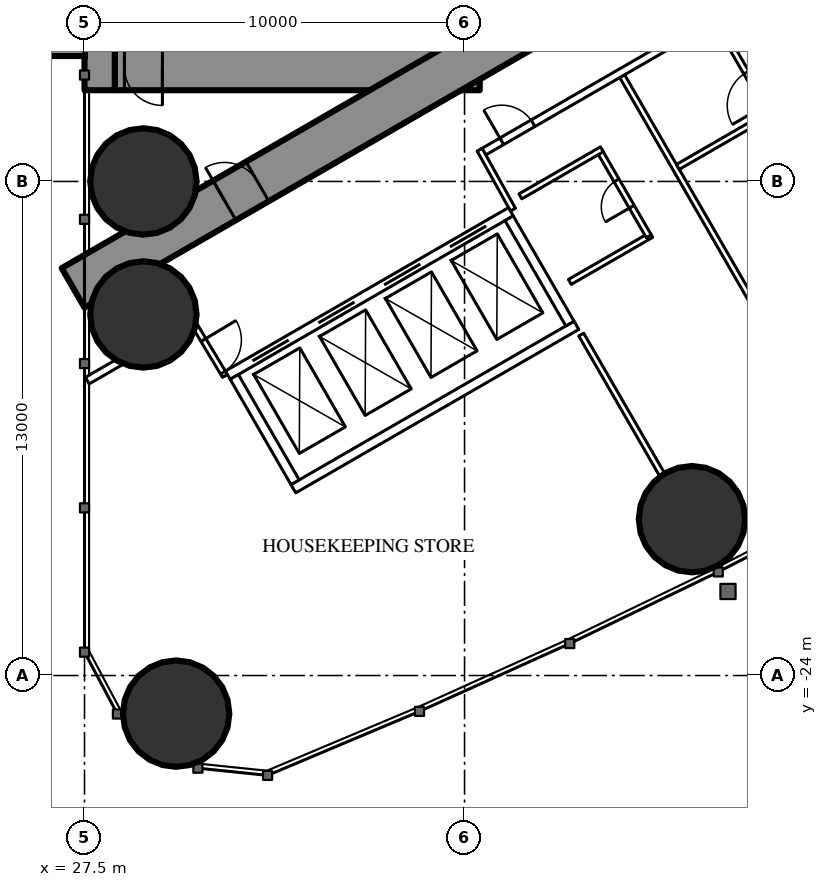
"""IFC4 building model, lengths in metres.
Left out: names, types, materials, properties, quantities, classifications, styles, units other than length and angle.
Written with IfcOpenShell. Run it as: python <this file> out.ifc"""

import sys

from ifc_helpers import new_model, si_unit, direction, frame, frame_2d, origin, origin_2d, place, context, subcontext, project, spatial, rectangle, hollow_circle, extrude, element, fill, save


model = new_model("IFC4")
c1 = context("Model", 3, precision=1e-05, world=origin(), true_north=direction((0.0, 1.0)))
c2 = subcontext(c1, "Body", "Model", "MODEL_VIEW")
j1 = project(units=[si_unit("LENGTHUNIT", "METRE"), si_unit("PLANEANGLEUNIT", "RADIAN")], contexts=[c1])
p1 = place(None, origin())
s1 = spatial("IfcSite", under=j1, at=p1, CompositionType="ELEMENT")
p2 = place(p1, origin())
s2 = spatial("IfcBuilding", under=s1, at=p2, CompositionType="ELEMENT")
p3 = place(p2, frame((0.0, 0.0, 42.5)))
s3 = spatial("IfcBuildingStorey", under=s2, at=p3, CompositionType="ELEMENT", Elevation=42.5)
for number, where, z_axis, x_axis in (
    (1, (29.911, -25.002, 0.0), (0.0, 0.0, 1.0), (1.0, 0.0, 0.0)),
    (2, (29.05, -11.0, 0.0), (0.0, 0.0, 1.0), (1.0, 0.0, 0.0)),
    (3, (29.05, -14.5, 0.0), (0.0, 0.0, 1.0), (1.0, 0.0, 0.0)),
    (4, (43.484, -19.886, 0.0), (0.0, 0.0, 1.0), (1.0, 0.0, 0.0)),
):
    element("IfcColumn", number, at=place(p3, frame(where, z_axis=z_axis, x_axis=x_axis)), inside=s3, PredefinedType="COLUMN", context=c2, shape_type="SweptSolid", body=[
        extrude(hollow_circle(Radius=1.4, WallThickness=0.12, at=origin_2d()), origin(), (0.0, 0.0, 1.0), 3.5),
    ])
p4 = place(p3, frame((27.9, -8.6, 0.0), z_axis=(0.0, 0.0, 1.0), x_axis=(0.0, 1.0, 0.0)))
e5 = element("IfcWall", 5, at=p4, inside=s3, PredefinedType="SHEAR", context=c2, shape_type="SweptSolid", body=[
    extrude(rectangle(XDim=17.2, YDim=0.8, at=frame_2d((8.6, 0.0))), origin(), (0.0, 0.0, 1.0), 3.5),
])
p5 = place(p4, frame((2.45, 0.0, 0.6)))
e6 = element("IfcOpeningElement", 6, at=p5, cuts=e5, PredefinedType="OPENING", context=c2, shape_type="SweptSolid", body=[
    extrude(rectangle(XDim=0.6, YDim=2.1, at=frame_2d((0.3, 1.05))), frame((0.0, 0.41, 0.0), z_axis=(0.0, -1.0, 0.0), x_axis=(1.0, 0.0, 0.0)), (0.0, 0.0, 1.0), 0.82),
])
p6 = place(p4, frame((14.15, 0.0, 0.6)))
e7 = element("IfcOpeningElement", 7, at=p6, cuts=e5, PredefinedType="OPENING", context=c2, shape_type="SweptSolid", body=[
    extrude(rectangle(XDim=0.6, YDim=2.1, at=frame_2d((0.3, 1.05))), frame((0.0, 0.41, 0.0), z_axis=(0.0, -1.0, 0.0), x_axis=(1.0, 0.0, 0.0)), (0.0, 0.0, 1.0), 0.82),
])
p7 = place(p3, frame((37.3, -8.6, 0.0), z_axis=(0.0, 0.0, 1.0), x_axis=(0.0, 1.0, 0.0)))
e8 = element("IfcWall", 8, at=p7, inside=s3, PredefinedType="SHEAR", context=c2, shape_type="SweptSolid", body=[
    extrude(rectangle(XDim=17.2, YDim=1.2, at=frame_2d((8.6, 0.0))), origin(), (0.0, 0.0, 1.0), 3.5),
])
p8 = place(p7, frame((7.7, 0.0, 0.0)))
e9 = element("IfcOpeningElement", 9, at=p8, cuts=e8, PredefinedType="OPENING", context=c2, shape_type="SweptSolid", body=[
    extrude(rectangle(XDim=1.8, YDim=2.2, at=frame_2d((0.9, 1.1))), frame((0.0, 0.61, 0.0), z_axis=(0.0, -1.0, 0.0), x_axis=(1.0, 0.0, 0.0)), (0.0, 0.0, 1.0), 1.22),
])
p9 = place(p3, frame((28.3, -8.0, 0.0), z_axis=(0.0, 0.0, 1.0), x_axis=(1.0, 0.0, 0.0)))
e10 = element("IfcWall", 10, at=p9, inside=s3, PredefinedType="SHEAR", context=c2, shape_type="SweptSolid", body=[
    extrude(rectangle(XDim=8.4, YDim=1.2, at=frame_2d((4.2, 0.0))), origin(), (0.0, 0.0, 1.0), 3.5),
])
p10 = place(p9, frame((0.25, 0.0, 0.0)))
e11 = element("IfcOpeningElement", 11, at=p10, cuts=e10, PredefinedType="OPENING", context=c2, shape_type="SweptSolid", body=[
    extrude(rectangle(XDim=1.0, YDim=2.2, at=frame_2d((0.5, 1.1))), frame((0.0, 0.61, 0.0), z_axis=(0.0, -1.0, 0.0), x_axis=(1.0, 0.0, 0.0)), (0.0, 0.0, 1.0), 1.22),
])
p11 = place(p3, frame((27.2, -13.8, 0.0), z_axis=(0.0, 0.0, 1.0), x_axis=(0.866027159892, 0.499996958321, 0.0)))
e12 = element("IfcWall", 12, at=p11, inside=s3, PredefinedType="SHEAR", context=c2, shape_type="SweptSolid", body=[
    extrude(rectangle(XDim=27.947, YDim=1.2, at=frame_2d((13.973, 0.0))), origin(), (0.0, 0.0, 1.0), 3.5),
])
p12 = place(p11, frame((4.6, 0.0, 0.0)))
e13 = element("IfcOpeningElement", 13, at=p12, cuts=e12, PredefinedType="OPENING", context=c2, shape_type="SweptSolid", body=[
    extrude(rectangle(XDim=1.0, YDim=2.2, at=frame_2d((0.5, 1.1))), frame((0.0, 0.61, 0.0), z_axis=(0.0, -1.0, 0.0), x_axis=(1.0, 0.0, 0.0)), (0.0, 0.0, 1.0), 1.22),
])
p13 = place(p11, frame((13.395, 0.0, 0.0)))
e14 = element("IfcOpeningElement", 14, at=p13, cuts=e12, PredefinedType="OPENING", context=c2, shape_type="SweptSolid", body=[
    extrude(rectangle(XDim=1.8, YDim=2.2, at=frame_2d((0.9, 1.1))), frame((0.0, 0.61, 0.0), z_axis=(0.0, -1.0, 0.0), x_axis=(1.0, 0.0, 0.0)), (0.0, 0.0, 1.0), 1.22),
])
p14 = place(p3, frame((41.647, -8.23, 0.0), z_axis=(0.0, 0.0, 1.0), x_axis=(0.49998590462, -0.866033541603, 0.0)))
e15 = element("IfcWall", 15, at=p14, inside=s3, PredefinedType="PARTITIONING", context=c2, shape_type="SweptSolid", body=[
    extrude(rectangle(XDim=12.621, YDim=0.15, at=frame_2d((6.311, 0.0))), origin(), (0.0, 0.0, 1.0), 3.25),
])
p15 = place(p3, frame((40.57, -15.03, 0.0), z_axis=(0.0, 0.0, 1.0), x_axis=(0.500012993597, -0.866017901798, 0.0)))
e16 = element("IfcWall", 16, at=p15, inside=s3, PredefinedType="PARTITIONING", context=c2, shape_type="SweptSolid", body=[
    extrude(rectangle(XDim=4.243, YDim=0.15, at=frame_2d((2.122, 0.0))), origin(), (0.0, 0.0, 1.0), 3.25),
])
p16 = place(p3, frame((27.572, -16.241, 0.0), z_axis=(0.0, 0.0, 1.0), x_axis=(0.866029654818, 0.499992636921, 0.0)))
e17 = element("IfcWall", 17, at=p16, inside=s3, PredefinedType="PARTITIONING", context=c2, shape_type="SweptSolid", body=[
    extrude(rectangle(XDim=3.155, YDim=0.2, at=frame_2d((1.577, 0.0))), origin(), (0.0, 0.0, 1.0), 3.25),
])
p17 = place(p3, frame((37.96, -10.243, 0.0), z_axis=(0.0, 0.0, 1.0), x_axis=(0.866026429433, 0.499998223521, 0.0)))
e18 = element("IfcWall", 18, at=p17, inside=s3, PredefinedType="PARTITIONING", context=c2, shape_type="SweptSolid", body=[
    extrude(rectangle(XDim=20.487, YDim=0.2, at=frame_2d((10.243, 0.0))), origin(), (0.0, 0.0, 1.0), 3.25),
])
p18 = place(p17, frame((7.325, 0.0, 0.0)))
e19 = element("IfcOpeningElement", 19, at=p18, cuts=e18, PredefinedType="OPENING", context=c2, shape_type="SweptSolid", body=[
    extrude(rectangle(XDim=1.0, YDim=2.2, at=frame_2d((0.5, 1.1))), frame((0.0, 0.11, 0.0), z_axis=(0.0, -1.0, 0.0), x_axis=(1.0, 0.0, 0.0)), (0.0, 0.0, 1.0), 0.22),
])
p19 = place(p17, frame((18.937, 0.0, 0.0)))
e20 = element("IfcOpeningElement", 20, at=p19, cuts=e18, PredefinedType="OPENING", context=c2, shape_type="SweptSolid", body=[
    extrude(rectangle(XDim=0.95, YDim=2.2, at=frame_2d((0.475, 1.1))), frame((0.0, 0.11, 0.0), z_axis=(0.0, -1.0, 0.0), x_axis=(1.0, 0.0, 0.0)), (0.0, 0.0, 1.0), 0.22),
])
p20 = place(p17, frame((0.6, 0.0, 0.0)))
e21 = element("IfcOpeningElement", 21, at=p20, cuts=e18, PredefinedType="OPENING", context=c2, shape_type="SweptSolid", body=[
    extrude(rectangle(XDim=0.95, YDim=2.2, at=frame_2d((0.475, 1.1))), frame((0.0, 0.11, 0.0), z_axis=(0.0, -1.0, 0.0), x_axis=(1.0, 0.0, 0.0)), (0.0, 0.0, 1.0), 0.22),
])
p21 = place(p3, frame((38.773, -11.742, 0.0), z_axis=(0.0, 0.0, 1.0), x_axis=(-0.485528096672, 0.8742210632, 0.0)))
e22 = element("IfcWall", 22, at=p21, inside=s3, PredefinedType="PARTITIONING", context=c2, shape_type="SweptSolid", body=[
    extrude(rectangle(XDim=1.805, YDim=0.15, at=frame_2d((0.903, 0.0))), origin(), (0.0, 0.0, 1.0), 3.25),
])
p22 = place(p3, frame((30.267, -14.569, 0.0), z_axis=(0.0, 0.0, 1.0), x_axis=(0.514336634837, -0.857588377991, 0.0)))
e23 = element("IfcWall", 23, at=p22, inside=s3, PredefinedType="PARTITIONING", context=c2, shape_type="SweptSolid", body=[
    extrude(rectangle(XDim=1.805, YDim=0.15, at=frame_2d((0.903, 0.0))), origin(), (0.0, 0.0, 1.0), 3.25),
])
p23 = place(p22, frame((0.703, 0.0, 0.0)))
e24 = element("IfcOpeningElement", 24, at=p23, cuts=e23, PredefinedType="OPENING", context=c2, shape_type="SweptSolid", body=[
    extrude(rectangle(XDim=1.0, YDim=2.2, at=frame_2d((0.5, 1.1))), frame((0.0, 0.085, 0.0), z_axis=(0.0, -1.0, 0.0), x_axis=(1.0, 0.0, 0.0)), (0.0, 0.0, 1.0), 0.17),
])
p24 = place(p3, frame((43.112, -10.617, 0.0), z_axis=(0.0, 0.0, 1.0), x_axis=(0.866018712932, 0.500011588718, 0.0)))
e25 = element("IfcWall", 25, at=p24, inside=s3, PredefinedType="PARTITIONING", context=c2, shape_type="SweptSolid", body=[
    extrude(rectangle(XDim=2.875, YDim=0.15, at=frame_2d((1.438, 0.0))), origin(), (0.0, 0.0, 1.0), 3.25),
])
p25 = place(p3, frame((44.137, -6.792, 0.0), z_axis=(0.0, 0.0, 1.0), x_axis=(0.49994636267, -0.866056369097, 0.0)))
e26 = element("IfcWall", 26, at=p25, inside=s3, PredefinedType="PARTITIONING", context=c2, shape_type="SweptSolid", body=[
    extrude(rectangle(XDim=2.8, YDim=0.15, at=frame_2d((1.4, 0.0))), origin(), (0.0, 0.0, 1.0), 3.25),
])
p26 = place(p25, frame((1.55, 0.0, 0.0)))
e27 = element("IfcOpeningElement", 27, at=p26, cuts=e26, PredefinedType="OPENING", context=c2, shape_type="SweptSolid", body=[
    extrude(rectangle(XDim=1.0, YDim=2.2, at=frame_2d((0.5, 1.1))), frame((0.0, 0.085, 0.0), z_axis=(0.0, -1.0, 0.0), x_axis=(1.0, 0.0, 0.0)), (0.0, 0.0, 1.0), 0.17),
])
p27 = place(p3, frame((40.27, -13.644, 0.0), z_axis=(0.0, 0.0, 1.0), x_axis=(0.866031185235, 0.4999899861, 0.0)))
e28 = element("IfcWall", 28, at=p27, inside=s3, PredefinedType="PARTITIONING", context=c2, shape_type="SweptSolid", body=[
    extrude(rectangle(XDim=2.475, YDim=0.15, at=frame_2d((1.238, 0.0))), origin(), (0.0, 0.0, 1.0), 3.25),
])
p28 = place(p3, frame((41.048, -10.193, 0.0), z_axis=(0.0, 0.0, 1.0), x_axis=(0.500047596559, -0.865997922154, 0.0)))
e29 = element("IfcWall", 29, at=p28, inside=s3, PredefinedType="PARTITIONING", context=c2, shape_type="SweptSolid", body=[
    extrude(rectangle(XDim=2.6, YDim=0.15, at=frame_2d((1.3, 0.0))), origin(), (0.0, 0.0, 1.0), 3.25),
])
p29 = place(p28, frame((0.9, 0.0, 0.0)))
e30 = element("IfcOpeningElement", 30, at=p29, cuts=e29, PredefinedType="OPENING", context=c2, shape_type="SweptSolid", body=[
    extrude(rectangle(XDim=0.8, YDim=2.2, at=frame_2d((0.4, 1.1))), frame((0.0, 0.085, 0.0), z_axis=(0.0, -1.0, 0.0), x_axis=(1.0, 0.0, 0.0)), (0.0, 0.0, 1.0), 0.17),
])
p30 = place(p3, frame((38.97, -11.393, 0.0), z_axis=(0.0, 0.0, 1.0), x_axis=(0.866031185235, 0.4999899861, 0.0)))
e31 = element("IfcWall", 31, at=p30, inside=s3, PredefinedType="PARTITIONING", context=c2, shape_type="SweptSolid", body=[
    extrude(rectangle(XDim=2.475, YDim=0.15, at=frame_2d((1.238, 0.0))), origin(), (0.0, 0.0, 1.0), 3.25),
])
p31 = place(p3, frame((31.271, -16.097, 0.0), z_axis=(0.0, 0.0, 1.0), x_axis=(0.86604045752, 0.499973925258, 0.0)))
e32 = element("IfcWall", 32, at=p31, inside=s3, PredefinedType="PARTITIONING", context=c2, shape_type="SweptSolid", body=[
    extrude(rectangle(XDim=8.6, YDim=0.25, at=frame_2d((4.3, 0.0))), origin(), (0.0, 0.0, 1.0), 3.25),
])
p32 = place(p31, frame((0.75, 0.0, 0.0)))
e33 = element("IfcOpeningElement", 33, at=p32, cuts=e32, PredefinedType="OPENING", context=c2, shape_type="SweptSolid", body=[
    extrude(rectangle(XDim=1.1, YDim=2.2, at=frame_2d((0.55, 1.1))), frame((0.0, 0.135, 0.0), z_axis=(0.0, -1.0, 0.0), x_axis=(1.0, 0.0, 0.0)), (0.0, 0.0, 1.0), 0.27),
])
p33 = place(p31, frame((2.75, 0.0, 0.0)))
e34 = element("IfcOpeningElement", 34, at=p33, cuts=e32, PredefinedType="OPENING", context=c2, shape_type="SweptSolid", body=[
    extrude(rectangle(XDim=1.1, YDim=2.2, at=frame_2d((0.55, 1.1))), frame((0.0, 0.135, 0.0), z_axis=(0.0, -1.0, 0.0), x_axis=(1.0, 0.0, 0.0)), (0.0, 0.0, 1.0), 0.27),
])
p34 = place(p31, frame((4.75, 0.0, 0.0)))
e35 = element("IfcOpeningElement", 35, at=p34, cuts=e32, PredefinedType="OPENING", context=c2, shape_type="SweptSolid", body=[
    extrude(rectangle(XDim=1.1, YDim=2.2, at=frame_2d((0.55, 1.1))), frame((0.0, 0.135, 0.0), z_axis=(0.0, -1.0, 0.0), x_axis=(1.0, 0.0, 0.0)), (0.0, 0.0, 1.0), 0.27),
])
p35 = place(p31, frame((6.75, 0.0, 0.0)))
e36 = element("IfcOpeningElement", 36, at=p35, cuts=e32, PredefinedType="OPENING", context=c2, shape_type="SweptSolid", body=[
    extrude(rectangle(XDim=1.1, YDim=2.2, at=frame_2d((0.55, 1.1))), frame((0.0, 0.135, 0.0), z_axis=(0.0, -1.0, 0.0), x_axis=(1.0, 0.0, 0.0)), (0.0, 0.0, 1.0), 0.27),
])
p36 = place(p3, frame((32.996, -19.086, 0.0), z_axis=(0.0, 0.0, 1.0), x_axis=(0.866028165386, 0.499995216735, 0.0)))
e37 = element("IfcWall", 37, at=p36, inside=s3, PredefinedType="PARTITIONING", context=c2, shape_type="SweptSolid", body=[
    extrude(rectangle(XDim=8.6, YDim=0.25, at=frame_2d((4.3, 0.0))), origin(), (0.0, 0.0, 1.0), 3.25),
])
for number, where, z_axis, x_axis in (
    (38, (31.441, -16.143, 0.0), (0.0, 0.0, 1.0), (0.5, -0.866, 0.0)),
    (39, (38.673, -11.968, 0.0), (0.0, 0.0, 1.0), (0.5, -0.866, 0.0)),
):
    element("IfcWall", number, at=place(p3, frame(where, z_axis=z_axis, x_axis=x_axis)), inside=s3, PredefinedType="PARTITIONING", context=c2, shape_type="SweptSolid", body=[
        extrude(rectangle(XDim=3.201, YDim=0.25, at=frame_2d((1.6, 0.0))), origin(), (0.0, 0.0, 1.0), 3.25),
    ])
p37 = place(p26, origin())
e40 = element("IfcDoor", 40, at=p37, inside=s3, OperationType="SINGLE_SWING_RIGHT", PredefinedType="DOOR", context=c2, shape_type="SweptSolid", body=[
    extrude(rectangle(XDim=1.0, YDim=2.2, at=frame_2d((0.5, 1.1))), frame((0.0, 0.025, 0.0), z_axis=(0.0, -1.0, 0.0), x_axis=(1.0, 0.0, 0.0)), (0.0, 0.0, 1.0), 0.05),
])
fill(e27, e40)
p38 = place(p29, origin())
e41 = element("IfcDoor", 41, at=p38, inside=s3, OperationType="SINGLE_SWING_RIGHT", PredefinedType="DOOR", context=c2, shape_type="SweptSolid", body=[
    extrude(rectangle(XDim=0.8, YDim=2.2, at=frame_2d((0.4, 1.1))), frame((0.0, 0.025, 0.0), z_axis=(0.0, -1.0, 0.0), x_axis=(1.0, 0.0, 0.0)), (0.0, 0.0, 1.0), 0.05),
])
fill(e30, e41)
p39 = place(p20, origin())
e42 = element("IfcDoor", 42, at=p39, inside=s3, OperationType="SINGLE_SWING_LEFT", PredefinedType="DOOR", context=c2, shape_type="SweptSolid", body=[
    extrude(rectangle(XDim=0.95, YDim=2.2, at=frame_2d((0.475, 1.1))), frame((0.0, 0.025, 0.0), z_axis=(0.0, -1.0, 0.0), x_axis=(1.0, 0.0, 0.0)), (0.0, 0.0, 1.0), 0.05),
])
fill(e21, e42)
p40 = place(p23, origin())
e43 = element("IfcDoor", 43, at=p40, inside=s3, OperationType="SINGLE_SWING_LEFT", PredefinedType="DOOR", context=c2, shape_type="SweptSolid", body=[
    extrude(rectangle(XDim=1.0, YDim=2.2, at=frame_2d((0.5, 1.1))), frame((0.0, 0.025, 0.0), z_axis=(0.0, -1.0, 0.0), x_axis=(1.0, 0.0, 0.0)), (0.0, 0.0, 1.0), 0.05),
])
fill(e24, e43)
p41 = place(p12, origin())
e44 = element("IfcDoor", 44, at=p41, inside=s3, OperationType="SINGLE_SWING_LEFT", PredefinedType="DOOR", context=c2, shape_type="SweptSolid", body=[
    extrude(rectangle(XDim=1.0, YDim=2.2, at=frame_2d((0.5, 1.1))), frame((0.0, 0.025, 0.0), z_axis=(0.0, -1.0, 0.0), x_axis=(1.0, 0.0, 0.0)), (0.0, 0.0, 1.0), 0.05),
])
fill(e13, e44)
p42 = place(p10, origin())
e45 = element("IfcDoor", 45, at=p42, inside=s3, OperationType="SINGLE_SWING_RIGHT", PredefinedType="DOOR", context=c2, shape_type="SweptSolid", body=[
    extrude(rectangle(XDim=1.0, YDim=2.2, at=frame_2d((0.5, 1.1))), frame((0.0, 0.025, 0.0), z_axis=(0.0, -1.0, 0.0), x_axis=(1.0, 0.0, 0.0)), (0.0, 0.0, 1.0), 0.05),
])
fill(e11, e45)
p43 = place(p32, origin())
e46 = element("IfcDoor", 46, at=p43, inside=s3, OperationType="DOUBLE_DOOR_SLIDING", PredefinedType="USERDEFINED", context=c2, shape_type="SweptSolid", body=[
    extrude(rectangle(XDim=1.1, YDim=2.2, at=frame_2d((0.55, 1.1))), frame((0.0, 0.025, 0.0), z_axis=(0.0, -1.0, 0.0), x_axis=(1.0, 0.0, 0.0)), (0.0, 0.0, 1.0), 0.05),
])
fill(e33, e46)
p44 = place(p33, origin())
e47 = element("IfcDoor", 47, at=p44, inside=s3, OperationType="DOUBLE_DOOR_SLIDING", PredefinedType="USERDEFINED", context=c2, shape_type="SweptSolid", body=[
    extrude(rectangle(XDim=1.1, YDim=2.2, at=frame_2d((0.55, 1.1))), frame((0.0, 0.025, 0.0), z_axis=(0.0, -1.0, 0.0), x_axis=(1.0, 0.0, 0.0)), (0.0, 0.0, 1.0), 0.05),
])
fill(e34, e47)
p45 = place(p34, origin())
e48 = element("IfcDoor", 48, at=p45, inside=s3, OperationType="DOUBLE_DOOR_SLIDING", PredefinedType="USERDEFINED", context=c2, shape_type="SweptSolid", body=[
    extrude(rectangle(XDim=1.1, YDim=2.2, at=frame_2d((0.55, 1.1))), frame((0.0, 0.025, 0.0), z_axis=(0.0, -1.0, 0.0), x_axis=(1.0, 0.0, 0.0)), (0.0, 0.0, 1.0), 0.05),
])
fill(e35, e48)
p46 = place(p35, origin())
e49 = element("IfcDoor", 49, at=p46, inside=s3, OperationType="DOUBLE_DOOR_SLIDING", PredefinedType="USERDEFINED", context=c2, shape_type="SweptSolid", body=[
    extrude(rectangle(XDim=1.1, YDim=2.2, at=frame_2d((0.55, 1.1))), frame((0.0, 0.025, 0.0), z_axis=(0.0, -1.0, 0.0), x_axis=(1.0, 0.0, 0.0)), (0.0, 0.0, 1.0), 0.05),
])
fill(e36, e49)
save(model, sys.argv[1])
